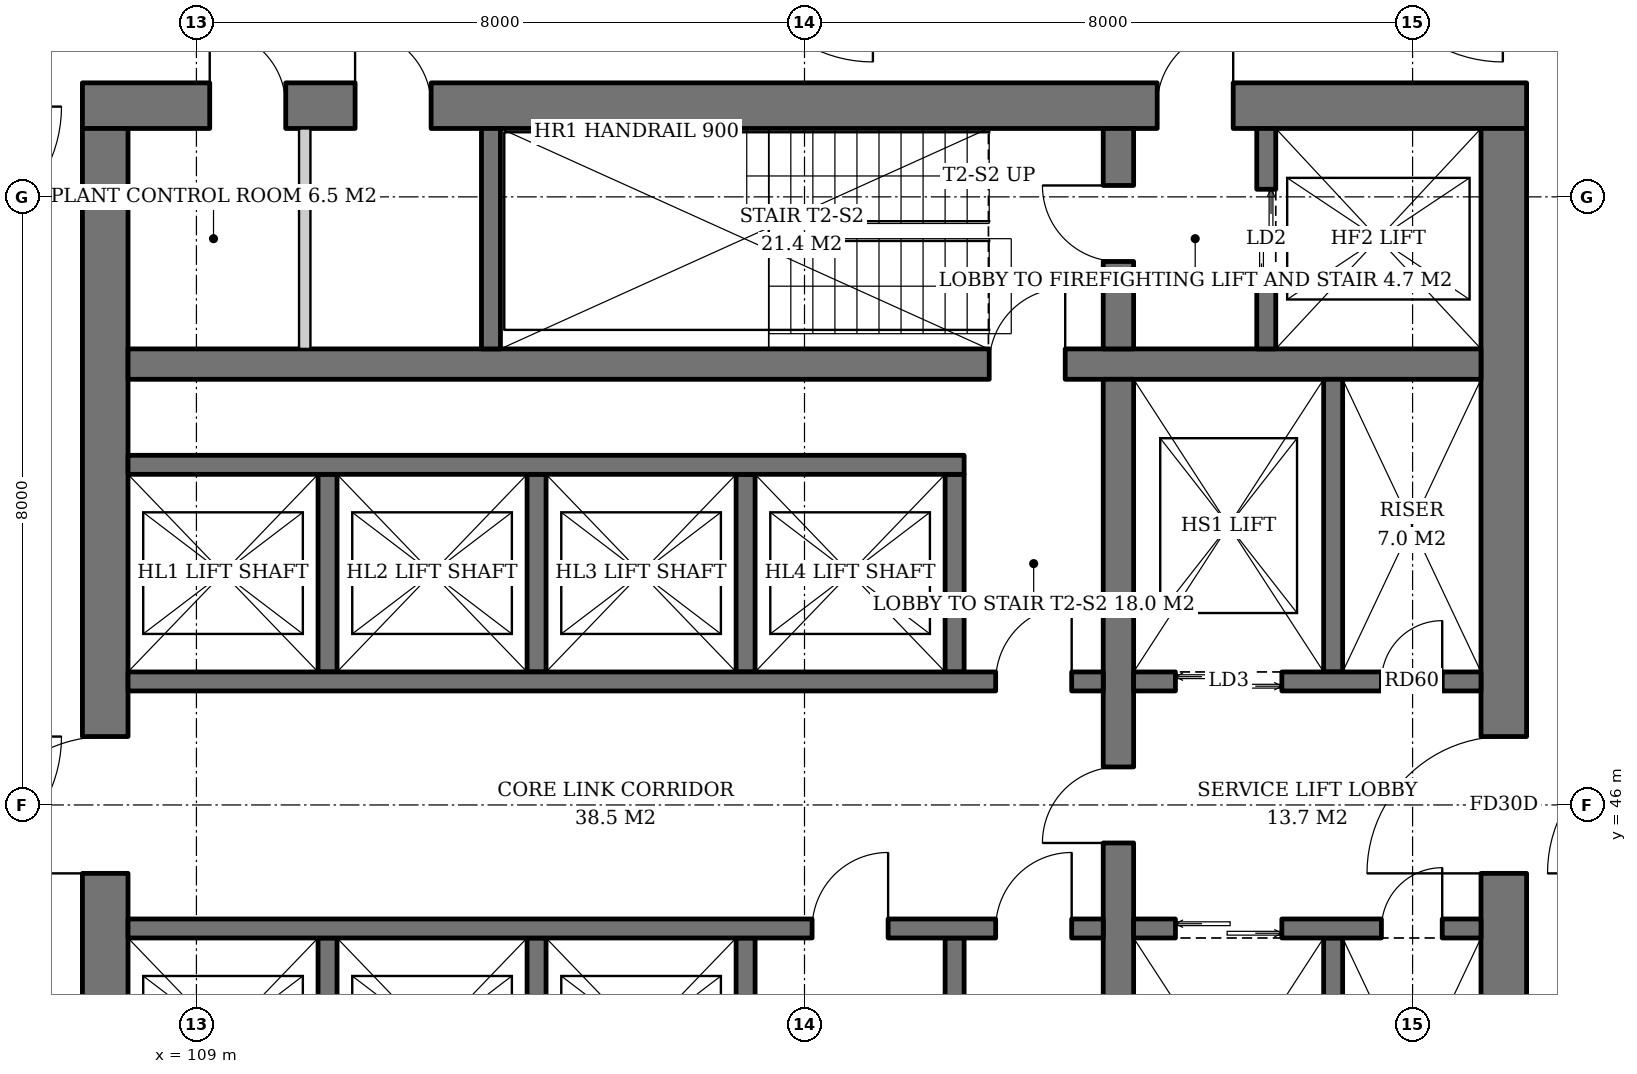
"""IFC4 building model, lengths in metres.
Left out: names, types, materials, properties, quantities, classifications, styles, units other than length and angle.
Written with IfcOpenShell. Run it as: python <this file> out.ifc"""

import sys

from ifc_helpers import new_model, si_unit, direction, frame, frame_2d, origin, place, context, subcontext, project, spatial, rectangle, extrude, element, fill, save


model = new_model("IFC4")
c1 = context("Model", 3, precision=1e-05, world=origin(), true_north=direction((0.0, 1.0)))
c2 = subcontext(c1, "Body", "Model", "MODEL_VIEW")
j1 = project(units=[si_unit("LENGTHUNIT", "METRE"), si_unit("PLANEANGLEUNIT", "RADIAN")], contexts=[c1])
p1 = place(None, origin())
s1 = spatial("IfcSite", under=j1, at=p1, CompositionType="ELEMENT")
p2 = place(p1, origin())
s2 = spatial("IfcBuilding", under=s1, at=p2, CompositionType="ELEMENT")
p3 = place(p2, frame((0.0, 0.0, 85.6)))
s3 = spatial("IfcBuildingStorey", under=s2, at=p3, CompositionType="ELEMENT", Elevation=85.6)
p4 = place(p3, frame((107.5, 55.2, 0.0), z_axis=(0.0, 0.0, 1.0), x_axis=(1.0, 0.0, 0.0)))
e1 = element("IfcWall", 1, at=p4, inside=s3, PredefinedType="SHEAR", context=c2, shape_type="SweptSolid", body=[
    extrude(rectangle(XDim=19.0, YDim=0.6, at=frame_2d((9.5, 0.0))), origin(), (0.0, 0.0, 1.0), 3.8),
])
p5 = place(p4, frame((14.14, 0.0, 0.0)))
e2 = element("IfcOpeningElement", 2, at=p5, cuts=e1, PredefinedType="OPENING", context=c2, shape_type="SweptSolid", body=[
    extrude(rectangle(XDim=1.0, YDim=2.1, at=frame_2d((0.5, 1.05))), frame((0.0, 0.31, 0.0), z_axis=(0.0, -1.0, 0.0), x_axis=(1.0, 0.0, 0.0)), (0.0, 0.0, 1.0), 0.62),
])
p6 = place(p4, frame((1.675, 0.0, 0.0)))
e3 = element("IfcOpeningElement", 3, at=p6, cuts=e1, PredefinedType="OPENING", context=c2, shape_type="SweptSolid", body=[
    extrude(rectangle(XDim=1.0, YDim=2.1, at=frame_2d((0.5, 1.05))), frame((0.0, 0.31, 0.0), z_axis=(0.0, -1.0, 0.0), x_axis=(1.0, 0.0, 0.0)), (0.0, 0.0, 1.0), 0.62),
])
p7 = place(p4, frame((3.587, 0.0, 0.0)))
e4 = element("IfcOpeningElement", 4, at=p7, cuts=e1, PredefinedType="OPENING", context=c2, shape_type="SweptSolid", body=[
    extrude(rectangle(XDim=1.0, YDim=2.1, at=frame_2d((0.5, 1.05))), frame((0.0, 0.31, 0.0), z_axis=(0.0, -1.0, 0.0), x_axis=(1.0, 0.0, 0.0)), (0.0, 0.0, 1.0), 0.62),
])
p8 = place(p3, frame((107.8, 37.1, 0.0), z_axis=(0.0, 0.0, 1.0), x_axis=(0.0, 1.0, 0.0)))
e5 = element("IfcWall", 5, at=p8, inside=s3, PredefinedType="SHEAR", context=c2, shape_type="SweptSolid", body=[
    extrude(rectangle(XDim=17.8, YDim=0.6, at=frame_2d((8.9, 0.0))), origin(), (0.0, 0.0, 1.0), 3.8),
])
p9 = place(p8, frame((8.0, 0.0, 0.0)))
e6 = element("IfcOpeningElement", 6, at=p9, cuts=e5, PredefinedType="OPENING", context=c2, shape_type="SweptSolid", body=[
    extrude(rectangle(XDim=1.8, YDim=2.4, at=frame_2d((0.9, 1.2))), frame((0.0, 0.31, 0.0), z_axis=(0.0, -1.0, 0.0), x_axis=(1.0, 0.0, 0.0)), (0.0, 0.0, 1.0), 0.62),
])
p10 = place(p3, frame((126.2, 37.1, 0.0), z_axis=(0.0, 0.0, 1.0), x_axis=(0.0, 1.0, 0.0)))
e7 = element("IfcWall", 7, at=p10, inside=s3, PredefinedType="SHEAR", context=c2, shape_type="SweptSolid", body=[
    extrude(rectangle(XDim=17.8, YDim=0.6, at=frame_2d((8.9, 0.0))), origin(), (0.0, 0.0, 1.0), 3.8),
])
p11 = place(p10, frame((8.0, 0.0, 0.0)))
e8 = element("IfcOpeningElement", 8, at=p11, cuts=e7, PredefinedType="OPENING", context=c2, shape_type="SweptSolid", body=[
    extrude(rectangle(XDim=1.8, YDim=2.4, at=frame_2d((0.9, 1.2))), frame((0.0, 0.31, 0.0), z_axis=(0.0, -1.0, 0.0), x_axis=(1.0, 0.0, 0.0)), (0.0, 0.0, 1.0), 0.62),
])
p12 = place(p3, frame((108.1, 51.8, 0.0), z_axis=(0.0, 0.0, 1.0), x_axis=(1.0, 0.0, 0.0)))
e9 = element("IfcWall", 9, at=p12, inside=s3, PredefinedType="SHEAR", context=c2, shape_type="SweptSolid", body=[
    extrude(rectangle(XDim=17.8, YDim=0.4, at=frame_2d((8.9, 0.0))), origin(), (0.0, 0.0, 1.0), 3.8),
])
p13 = place(p12, frame((11.33, 0.0, 0.0)))
e10 = element("IfcOpeningElement", 10, at=p13, cuts=e9, PredefinedType="OPENING", context=c2, shape_type="SweptSolid", body=[
    extrude(rectangle(XDim=1.0, YDim=2.1, at=frame_2d((0.5, 1.05))), frame((0.0, 0.21, 0.0), z_axis=(0.0, -1.0, 0.0), x_axis=(1.0, 0.0, 0.0)), (0.0, 0.0, 1.0), 0.42),
])
p14 = place(p3, frame((121.13, 40.4, 0.0), z_axis=(0.0, 0.0, 1.0), x_axis=(0.0, 1.0, 0.0)))
e11 = element("IfcWall", 11, at=p14, inside=s3, PredefinedType="SHEAR", context=c2, shape_type="SweptSolid", body=[
    extrude(rectangle(XDim=11.2, YDim=0.4, at=frame_2d((5.6, 0.0))), origin(), (0.0, 0.0, 1.0), 3.8),
])
p15 = place(p14, frame((5.1, 0.0, 0.0)))
e12 = element("IfcOpeningElement", 12, at=p15, cuts=e11, PredefinedType="OPENING", context=c2, shape_type="SweptSolid", body=[
    extrude(rectangle(XDim=1.0, YDim=2.1, at=frame_2d((0.5, 1.05))), frame((0.0, 0.21, 0.0), z_axis=(0.0, -1.0, 0.0), x_axis=(1.0, 0.0, 0.0)), (0.0, 0.0, 1.0), 0.42),
])
p16 = place(p3, frame((121.13, 52.0, 0.0), z_axis=(0.0, 0.0, 1.0), x_axis=(0.0, 1.0, 0.0)))
e13 = element("IfcWall", 13, at=p16, inside=s3, PredefinedType="SHEAR", context=c2, shape_type="SweptSolid", body=[
    extrude(rectangle(XDim=2.9, YDim=0.4, at=frame_2d((1.45, 0.0))), origin(), (0.0, 0.0, 1.0), 3.8),
])
p17 = place(p16, frame((1.15, 0.0, 0.0)))
e14 = element("IfcOpeningElement", 14, at=p17, cuts=e13, PredefinedType="OPENING", context=c2, shape_type="SweptSolid", body=[
    extrude(rectangle(XDim=1.0, YDim=2.1, at=frame_2d((0.5, 1.05))), frame((0.0, 0.21, 0.0), z_axis=(0.0, -1.0, 0.0), x_axis=(1.0, 0.0, 0.0)), (0.0, 0.0, 1.0), 0.42),
])
p18 = place(p3, frame((112.875, 52.0, 0.0), z_axis=(0.0, 0.0, 1.0), x_axis=(0.0, 1.0, 0.0)))
e15 = element("IfcWall", 15, at=p18, inside=s3, PredefinedType="SHEAR", context=c2, shape_type="SweptSolid", body=[
    extrude(rectangle(XDim=2.9, YDim=0.25, at=frame_2d((1.45, 0.0))), origin(), (0.0, 0.0, 1.0), 3.8),
])
p19 = place(p3, frame((123.075, 52.0, 0.0), z_axis=(0.0, 0.0, 1.0), x_axis=(0.0, 1.0, 0.0)))
e16 = element("IfcWall", 16, at=p19, inside=s3, PredefinedType="SHEAR", context=c2, shape_type="SweptSolid", body=[
    extrude(rectangle(XDim=2.9, YDim=0.25, at=frame_2d((1.45, 0.0))), origin(), (0.0, 0.0, 1.0), 3.8),
])
p20 = place(p19, frame((0.8, 0.0, 0.0)))
e17 = element("IfcOpeningElement", 17, at=p20, cuts=e16, PredefinedType="OPENING", context=c2, shape_type="SweptSolid", body=[
    extrude(rectangle(XDim=1.3, YDim=2.2, at=frame_2d((0.65, 1.1))), frame((0.0, 0.135, 0.0), z_axis=(0.0, -1.0, 0.0), x_axis=(1.0, 0.0, 0.0)), (0.0, 0.0, 1.0), 0.27),
])
for number, where, z_axis, x_axis in (
    (18, (110.725, 47.75, 0.0), (0.0, 0.0, 1.0), (0.0, 1.0, 0.0)),
    (19, (113.475, 47.75, 0.0), (0.0, 0.0, 1.0), (0.0, 1.0, 0.0)),
    (20, (116.225, 47.75, 0.0), (0.0, 0.0, 1.0), (0.0, 1.0, 0.0)),
    (21, (118.975, 47.75, 0.0), (0.0, 0.0, 1.0), (0.0, 1.0, 0.0)),
):
    element("IfcWall", number, at=place(p3, frame(where, z_axis=z_axis, x_axis=x_axis)), inside=s3, PredefinedType="SHEAR", context=c2, shape_type="SweptSolid", body=[
        extrude(rectangle(XDim=2.6, YDim=0.25, at=frame_2d((1.3, 0.0))), origin(), (0.0, 0.0, 1.0), 3.8),
    ])
p21 = place(p3, frame((108.1, 50.475, 0.0), z_axis=(0.0, 0.0, 1.0), x_axis=(1.0, 0.0, 0.0)))
e22 = element("IfcWall", 22, at=p21, inside=s3, PredefinedType="SHEAR", context=c2, shape_type="SweptSolid", body=[
    extrude(rectangle(XDim=11.0, YDim=0.25, at=frame_2d((5.5, 0.0))), origin(), (0.0, 0.0, 1.0), 3.8),
])
p22 = place(p3, frame((108.1, 47.625, 0.0), z_axis=(0.0, 0.0, 1.0), x_axis=(1.0, 0.0, 0.0)))
e23 = element("IfcWall", 23, at=p22, inside=s3, PredefinedType="SHEAR", context=c2, shape_type="SweptSolid", body=[
    extrude(rectangle(XDim=12.83, YDim=0.25, at=frame_2d((6.415, 0.0))), origin(), (0.0, 0.0, 1.0), 3.8),
])
p23 = place(p22, frame((11.415, 0.0, 0.0)))
e24 = element("IfcOpeningElement", 24, at=p23, cuts=e23, PredefinedType="OPENING", context=c2, shape_type="SweptSolid", body=[
    extrude(rectangle(XDim=1.0, YDim=2.1, at=frame_2d((0.5, 1.05))), frame((0.0, 0.135, 0.0), z_axis=(0.0, -1.0, 0.0), x_axis=(1.0, 0.0, 0.0)), (0.0, 0.0, 1.0), 0.27),
])
for number, where, z_axis, x_axis in (
    (25, (110.725, 44.25, 0.0), (0.0, 0.0, 1.0), (0.0, -1.0, 0.0)),
    (26, (113.475, 44.25, 0.0), (0.0, 0.0, 1.0), (0.0, -1.0, 0.0)),
    (27, (116.225, 44.25, 0.0), (0.0, 0.0, 1.0), (0.0, -1.0, 0.0)),
    (28, (118.975, 44.25, 0.0), (0.0, 0.0, 1.0), (0.0, -1.0, 0.0)),
):
    element("IfcWall", number, at=place(p3, frame(where, z_axis=z_axis, x_axis=x_axis)), inside=s3, PredefinedType="SHEAR", context=c2, shape_type="SweptSolid", body=[
        extrude(rectangle(XDim=2.6, YDim=0.25, at=frame_2d((1.3, 0.0))), origin(), (0.0, 0.0, 1.0), 3.8),
    ])
p24 = place(p3, frame((108.1, 44.375, 0.0), z_axis=(0.0, 0.0, 1.0), x_axis=(1.0, 0.0, 0.0)))
e29 = element("IfcWall", 29, at=p24, inside=s3, PredefinedType="SHEAR", context=c2, shape_type="SweptSolid", body=[
    extrude(rectangle(XDim=12.83, YDim=0.25, at=frame_2d((6.415, 0.0))), origin(), (0.0, 0.0, 1.0), 3.8),
])
p25 = place(p24, frame((9.0, 0.0, 0.0)))
e30 = element("IfcOpeningElement", 30, at=p25, cuts=e29, PredefinedType="OPENING", context=c2, shape_type="SweptSolid", body=[
    extrude(rectangle(XDim=1.0, YDim=2.1, at=frame_2d((0.5, 1.05))), frame((0.0, 0.135, 0.0), z_axis=(0.0, -1.0, 0.0), x_axis=(1.0, 0.0, 0.0)), (0.0, 0.0, 1.0), 0.27),
])
p26 = place(p24, frame((11.415, 0.0, 0.0)))
e31 = element("IfcOpeningElement", 31, at=p26, cuts=e29, PredefinedType="OPENING", context=c2, shape_type="SweptSolid", body=[
    extrude(rectangle(XDim=1.0, YDim=2.1, at=frame_2d((0.5, 1.05))), frame((0.0, 0.135, 0.0), z_axis=(0.0, -1.0, 0.0), x_axis=(1.0, 0.0, 0.0)), (0.0, 0.0, 1.0), 0.27),
])
p27 = place(p3, frame((123.955, 47.75, 0.0), z_axis=(0.0, 0.0, 1.0), x_axis=(0.0, 1.0, 0.0)))
e32 = element("IfcWall", 32, at=p27, inside=s3, PredefinedType="SHEAR", context=c2, shape_type="SweptSolid", body=[
    extrude(rectangle(XDim=3.85, YDim=0.25, at=frame_2d((1.925, 0.0))), origin(), (0.0, 0.0, 1.0), 3.8),
])
p28 = place(p3, frame((121.33, 47.625, 0.0), z_axis=(0.0, 0.0, 1.0), x_axis=(1.0, 0.0, 0.0)))
e33 = element("IfcWall", 33, at=p28, inside=s3, PredefinedType="SHEAR", context=c2, shape_type="SweptSolid", body=[
    extrude(rectangle(XDim=4.57, YDim=0.25, at=frame_2d((2.285, 0.0))), origin(), (0.0, 0.0, 1.0), 3.8),
])
p29 = place(p28, frame((0.55, 0.0, 0.0)))
e34 = element("IfcOpeningElement", 34, at=p29, cuts=e33, PredefinedType="OPENING", context=c2, shape_type="SweptSolid", body=[
    extrude(rectangle(XDim=1.4, YDim=2.4, at=frame_2d((0.7, 1.2))), frame((0.0, 0.135, 0.0), z_axis=(0.0, -1.0, 0.0), x_axis=(1.0, 0.0, 0.0)), (0.0, 0.0, 1.0), 0.27),
])
p30 = place(p28, frame((3.26, 0.0, 0.0)))
e35 = element("IfcOpeningElement", 35, at=p30, cuts=e33, PredefinedType="OPENING", context=c2, shape_type="SweptSolid", body=[
    extrude(rectangle(XDim=0.8, YDim=2.0, at=frame_2d((0.4, 1.0))), frame((0.0, 0.135, 0.0), z_axis=(0.0, -1.0, 0.0), x_axis=(1.0, 0.0, 0.0)), (0.0, 0.0, 1.0), 0.27),
])
p31 = place(p3, frame((123.955, 44.25, 0.0), z_axis=(0.0, 0.0, 1.0), x_axis=(0.0, -1.0, 0.0)))
e36 = element("IfcWall", 36, at=p31, inside=s3, PredefinedType="SHEAR", context=c2, shape_type="SweptSolid", body=[
    extrude(rectangle(XDim=3.85, YDim=0.25, at=frame_2d((1.925, 0.0))), origin(), (0.0, 0.0, 1.0), 3.8),
])
p32 = place(p3, frame((121.33, 44.375, 0.0), z_axis=(0.0, 0.0, 1.0), x_axis=(1.0, 0.0, 0.0)))
e37 = element("IfcWall", 37, at=p32, inside=s3, PredefinedType="SHEAR", context=c2, shape_type="SweptSolid", body=[
    extrude(rectangle(XDim=4.57, YDim=0.25, at=frame_2d((2.285, 0.0))), origin(), (0.0, 0.0, 1.0), 3.8),
])
p33 = place(p32, frame((0.55, 0.0, 0.0)))
e38 = element("IfcOpeningElement", 38, at=p33, cuts=e37, PredefinedType="OPENING", context=c2, shape_type="SweptSolid", body=[
    extrude(rectangle(XDim=1.4, YDim=2.4, at=frame_2d((0.7, 1.2))), frame((0.0, 0.135, 0.0), z_axis=(0.0, -1.0, 0.0), x_axis=(1.0, 0.0, 0.0)), (0.0, 0.0, 1.0), 0.27),
])
p34 = place(p32, frame((3.26, 0.0, 0.0)))
e39 = element("IfcOpeningElement", 39, at=p34, cuts=e37, PredefinedType="OPENING", context=c2, shape_type="SweptSolid", body=[
    extrude(rectangle(XDim=0.8, YDim=2.0, at=frame_2d((0.4, 1.0))), frame((0.0, 0.135, 0.0), z_axis=(0.0, -1.0, 0.0), x_axis=(1.0, 0.0, 0.0)), (0.0, 0.0, 1.0), 0.27),
])
p35 = place(p3, frame((110.425, 52.0, 0.0), z_axis=(0.0, 0.0, 1.0), x_axis=(0.0, 1.0, 0.0)))
e40 = element("IfcWall", 40, at=p35, inside=s3, PredefinedType="SOLIDWALL", context=c2, shape_type="SweptSolid", body=[
    extrude(rectangle(XDim=2.9, YDim=0.15, at=frame_2d((1.45, 0.0))), origin(), (0.0, 0.0, 1.0), 3.6),
])
p36 = place(p20, origin())
e41 = element("IfcDoor", 41, at=p36, inside=s3, OperationType="DOUBLE_DOOR_SLIDING", PredefinedType="DOOR", context=c2, shape_type="SweptSolid", body=[
    extrude(rectangle(XDim=1.3, YDim=2.2, at=frame_2d((0.65, 1.1))), frame((0.0, 0.025, 0.0), z_axis=(0.0, -1.0, 0.0), x_axis=(1.0, 0.0, 0.0)), (0.0, 0.0, 1.0), 0.05),
])
fill(e17, e41)
p37 = place(p23, origin())
e42 = element("IfcDoor", 42, at=p37, inside=s3, OperationType="SINGLE_SWING_RIGHT", PredefinedType="DOOR", context=c2, shape_type="SweptSolid", body=[
    extrude(rectangle(XDim=1.0, YDim=2.1, at=frame_2d((0.5, 1.05))), frame((0.0, 0.025, 0.0), z_axis=(0.0, -1.0, 0.0), x_axis=(1.0, 0.0, 0.0)), (0.0, 0.0, 1.0), 0.05),
])
fill(e24, e42)
p38 = place(p25, origin())
e43 = element("IfcDoor", 43, at=p38, inside=s3, OperationType="SINGLE_SWING_RIGHT", PredefinedType="DOOR", context=c2, shape_type="SweptSolid", body=[
    extrude(rectangle(XDim=1.0, YDim=2.1, at=frame_2d((0.5, 1.05))), frame((0.0, 0.025, 0.0), z_axis=(0.0, -1.0, 0.0), x_axis=(1.0, 0.0, 0.0)), (0.0, 0.0, 1.0), 0.05),
])
fill(e30, e43)
p39 = place(p26, origin())
e44 = element("IfcDoor", 44, at=p39, inside=s3, OperationType="SINGLE_SWING_RIGHT", PredefinedType="DOOR", context=c2, shape_type="SweptSolid", body=[
    extrude(rectangle(XDim=1.0, YDim=2.1, at=frame_2d((0.5, 1.05))), frame((0.0, 0.025, 0.0), z_axis=(0.0, -1.0, 0.0), x_axis=(1.0, 0.0, 0.0)), (0.0, 0.0, 1.0), 0.05),
])
fill(e31, e44)
p40 = place(p29, origin())
e45 = element("IfcDoor", 45, at=p40, inside=s3, OperationType="DOUBLE_DOOR_SLIDING", PredefinedType="DOOR", context=c2, shape_type="SweptSolid", body=[
    extrude(rectangle(XDim=1.4, YDim=2.4, at=frame_2d((0.7, 1.2))), frame((0.0, 0.025, 0.0), z_axis=(0.0, -1.0, 0.0), x_axis=(1.0, 0.0, 0.0)), (0.0, 0.0, 1.0), 0.05),
])
fill(e34, e45)
p41 = place(p30, origin())
e46 = element("IfcDoor", 46, at=p41, inside=s3, OperationType="SINGLE_SWING_RIGHT", PredefinedType="DOOR", context=c2, shape_type="SweptSolid", body=[
    extrude(rectangle(XDim=0.8, YDim=2.0, at=frame_2d((0.4, 1.0))), frame((0.0, 0.025, 0.0), z_axis=(0.0, -1.0, 0.0), x_axis=(1.0, 0.0, 0.0)), (0.0, 0.0, 1.0), 0.05),
])
fill(e35, e46)
p42 = place(p33, origin())
e47 = element("IfcDoor", 47, at=p42, inside=s3, OperationType="DOUBLE_DOOR_SLIDING", PredefinedType="DOOR", context=c2, shape_type="SweptSolid", body=[
    extrude(rectangle(XDim=1.4, YDim=2.4, at=frame_2d((0.7, 1.2))), frame((0.0, 0.025, 0.0), z_axis=(0.0, -1.0, 0.0), x_axis=(1.0, 0.0, 0.0)), (0.0, 0.0, 1.0), 0.05),
])
fill(e38, e47)
p43 = place(p34, origin())
e48 = element("IfcDoor", 48, at=p43, inside=s3, OperationType="SINGLE_SWING_RIGHT", PredefinedType="DOOR", context=c2, shape_type="SweptSolid", body=[
    extrude(rectangle(XDim=0.8, YDim=2.0, at=frame_2d((0.4, 1.0))), frame((0.0, 0.025, 0.0), z_axis=(0.0, -1.0, 0.0), x_axis=(1.0, 0.0, 0.0)), (0.0, 0.0, 1.0), 0.05),
])
fill(e39, e48)
p44 = place(p15, origin())
e49 = element("IfcDoor", 49, at=p44, inside=s3, OperationType="SINGLE_SWING_LEFT", PredefinedType="DOOR", context=c2, shape_type="SweptSolid", body=[
    extrude(rectangle(XDim=1.0, YDim=2.1, at=frame_2d((0.5, 1.05))), frame((0.0, 0.025, 0.0), z_axis=(0.0, -1.0, 0.0), x_axis=(1.0, 0.0, 0.0)), (0.0, 0.0, 1.0), 0.05),
])
fill(e12, e49)
p45 = place(p17, origin())
e50 = element("IfcDoor", 50, at=p45, inside=s3, OperationType="SINGLE_SWING_RIGHT", PredefinedType="DOOR", context=c2, shape_type="SweptSolid", body=[
    extrude(rectangle(XDim=1.0, YDim=2.1, at=frame_2d((0.5, 1.05))), frame((0.0, 0.025, 0.0), z_axis=(0.0, -1.0, 0.0), x_axis=(1.0, 0.0, 0.0)), (0.0, 0.0, 1.0), 0.05),
])
fill(e14, e50)
p46 = place(p5, origin())
e51 = element("IfcDoor", 51, at=p46, inside=s3, OperationType="SINGLE_SWING_RIGHT", PredefinedType="DOOR", context=c2, shape_type="SweptSolid", body=[
    extrude(rectangle(XDim=1.0, YDim=2.1, at=frame_2d((0.5, 1.05))), frame((0.0, 0.025, 0.0), z_axis=(0.0, -1.0, 0.0), x_axis=(1.0, 0.0, 0.0)), (0.0, 0.0, 1.0), 0.05),
])
fill(e2, e51)
p47 = place(p9, origin())
e52 = element("IfcDoor", 52, at=p47, inside=s3, OperationType="DOUBLE_DOOR_SINGLE_SWING", PredefinedType="DOOR", context=c2, shape_type="SweptSolid", body=[
    extrude(rectangle(XDim=1.8, YDim=2.4, at=frame_2d((0.9, 1.2))), frame((0.0, 0.025, 0.0), z_axis=(0.0, -1.0, 0.0), x_axis=(1.0, 0.0, 0.0)), (0.0, 0.0, 1.0), 0.05),
])
fill(e6, e52)
p48 = place(p11, origin())
e53 = element("IfcDoor", 53, at=p48, inside=s3, OperationType="DOUBLE_DOOR_SINGLE_SWING", PredefinedType="DOOR", context=c2, shape_type="SweptSolid", body=[
    extrude(rectangle(XDim=1.8, YDim=2.4, at=frame_2d((0.9, 1.2))), frame((0.0, 0.025, 0.0), z_axis=(0.0, -1.0, 0.0), x_axis=(1.0, 0.0, 0.0)), (0.0, 0.0, 1.0), 0.05),
])
fill(e8, e53)
p49 = place(p13, origin())
e54 = element("IfcDoor", 54, at=p49, inside=s3, OperationType="SINGLE_SWING_RIGHT", PredefinedType="DOOR", context=c2, shape_type="SweptSolid", body=[
    extrude(rectangle(XDim=1.0, YDim=2.1, at=frame_2d((0.5, 1.05))), frame((0.0, 0.025, 0.0), z_axis=(0.0, -1.0, 0.0), x_axis=(1.0, 0.0, 0.0)), (0.0, 0.0, 1.0), 0.05),
])
fill(e10, e54)
p50 = place(p6, origin())
e55 = element("IfcDoor", 55, at=p50, inside=s3, OperationType="SINGLE_SWING_LEFT", PredefinedType="DOOR", context=c2, shape_type="SweptSolid", body=[
    extrude(rectangle(XDim=1.0, YDim=2.1, at=frame_2d((0.5, 1.05))), frame((0.0, -0.24, 0.0), z_axis=(0.0, -1.0, 0.0), x_axis=(1.0, 0.0, 0.0)), (0.0, 0.0, 1.0), 0.05),
])
fill(e3, e55)
p51 = place(p7, origin())
e56 = element("IfcDoor", 56, at=p51, inside=s3, OperationType="SINGLE_SWING_LEFT", PredefinedType="DOOR", context=c2, shape_type="SweptSolid", body=[
    extrude(rectangle(XDim=1.0, YDim=2.1, at=frame_2d((0.5, 1.05))), frame((0.0, -0.24, 0.0), z_axis=(0.0, -1.0, 0.0), x_axis=(1.0, 0.0, 0.0)), (0.0, 0.0, 1.0), 0.05),
])
fill(e4, e56)
save(model, sys.argv[1])
